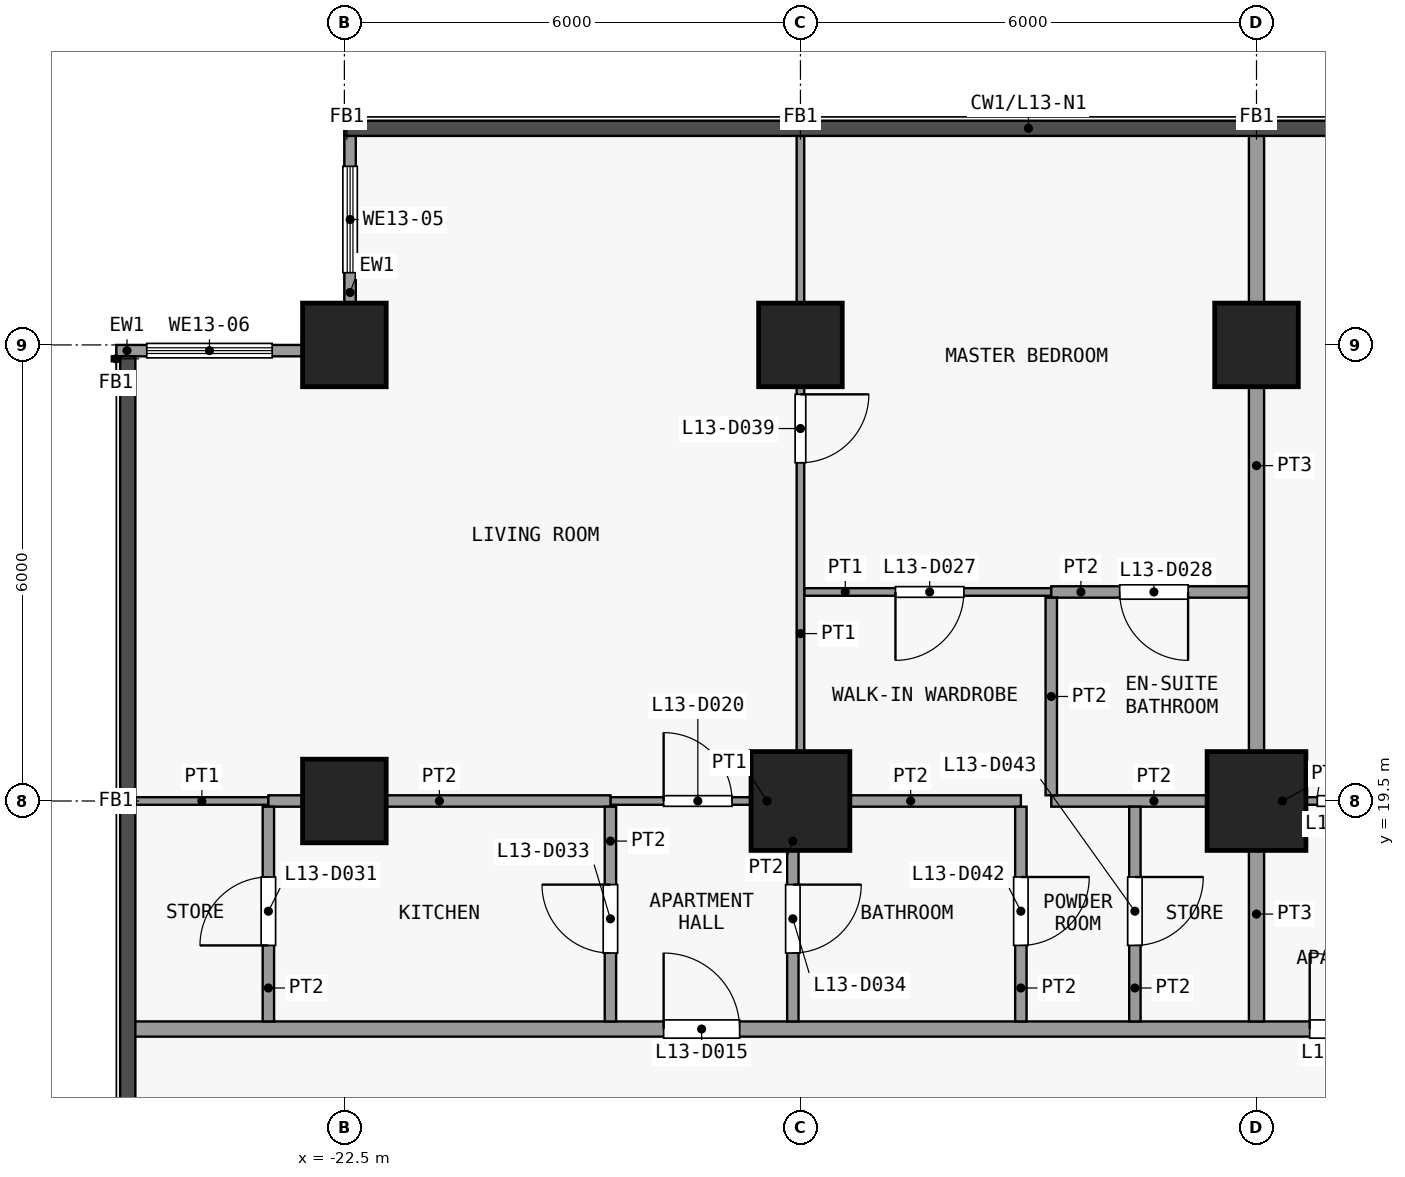
"""IFC4 building model, lengths in metres.
Left out: names, types, materials, properties, quantities, classifications, styles, units other than length and angle.
Written with IfcOpenShell. Run it as: python <this file> out.ifc"""

import sys

from ifc_helpers import new_model, si_unit, direction, frame, frame_2d, origin, origin_2d, place, context, subcontext, project, spatial, rectangle, extrude, element, fill, save


model = new_model("IFC4")
c1 = context("Model", 3, precision=1e-05, world=origin(), true_north=direction((0.0, 1.0)))
c2 = subcontext(c1, "Body", "Model", "MODEL_VIEW")
j1 = project(units=[si_unit("LENGTHUNIT", "METRE"), si_unit("PLANEANGLEUNIT", "RADIAN")], contexts=[c1])
p1 = place(None, origin())
s1 = spatial("IfcSite", under=j1, at=p1, CompositionType="ELEMENT")
p2 = place(p1, origin())
s2 = spatial("IfcBuilding", under=s1, at=p2, CompositionType="ELEMENT")
p3 = place(p2, frame((0.0, 0.0, 57.7)))
s3 = spatial("IfcBuildingStorey", under=s2, at=p3, CompositionType="ELEMENT", Elevation=57.7)
for number, where, z_axis, x_axis in (
    (1, (-22.5, 19.5, 0.0), (0.0, 0.0, 1.0), (1.0, 0.0, 0.0)),
    (2, (-22.5, 25.5, 0.0), (0.0, 0.0, 1.0), (1.0, 0.0, 0.0)),
):
    element("IfcColumn", number, at=place(p3, frame(where, z_axis=z_axis, x_axis=x_axis)), inside=s3, PredefinedType="COLUMN", context=c2, shape_type="SweptSolid", body=[
        extrude(rectangle(XDim=1.1, YDim=1.1, at=origin_2d()), origin(), (0.0, 0.0, 1.0), 3.6),
    ])
p4 = place(p3, frame((-16.5, 19.5, 0.0), z_axis=(0.0, 0.0, 1.0), x_axis=(1.0, 0.0, 0.0)))
e3 = element("IfcColumn", 3, at=p4, inside=s3, PredefinedType="COLUMN", context=c2, shape_type="SweptSolid", body=[
    extrude(rectangle(XDim=1.3, YDim=1.3, at=origin_2d()), origin(), (0.0, 0.0, 1.0), 3.6),
])
p5 = place(p3, frame((-16.5, 25.5, 0.0), z_axis=(0.0, 0.0, 1.0), x_axis=(1.0, 0.0, 0.0)))
e4 = element("IfcColumn", 4, at=p5, inside=s3, PredefinedType="COLUMN", context=c2, shape_type="SweptSolid", body=[
    extrude(rectangle(XDim=1.1, YDim=1.1, at=origin_2d()), origin(), (0.0, 0.0, 1.0), 3.6),
])
p6 = place(p3, frame((-10.5, 19.5, 0.0), z_axis=(0.0, 0.0, 1.0), x_axis=(1.0, 0.0, 0.0)))
e5 = element("IfcColumn", 5, at=p6, inside=s3, PredefinedType="COLUMN", context=c2, shape_type="SweptSolid", body=[
    extrude(rectangle(XDim=1.3, YDim=1.3, at=origin_2d()), origin(), (0.0, 0.0, 1.0), 3.6),
])
p7 = place(p3, frame((-10.5, 25.5, 0.0), z_axis=(0.0, 0.0, 1.0), x_axis=(1.0, 0.0, 0.0)))
e6 = element("IfcColumn", 6, at=p7, inside=s3, PredefinedType="COLUMN", context=c2, shape_type="SweptSolid", body=[
    extrude(rectangle(XDim=1.1, YDim=1.1, at=origin_2d()), origin(), (0.0, 0.0, 1.0), 3.6),
])
p8 = place(p3, frame((-22.425, 26.05, 0.0), z_axis=(0.0, 0.0, 1.0), x_axis=(0.0, 1.0, 0.0)))
e7 = element("IfcWall", 7, at=p8, inside=s3, PredefinedType="SOLIDWALL", context=c2, shape_type="SweptSolid", body=[
    extrude(rectangle(XDim=2.2, YDim=0.15, at=frame_2d((1.1, 0.0))), origin(), (0.0, 0.0, 1.0), 3.3),
])
p9 = place(p8, frame((0.4, 0.0, 0.9)))
e8 = element("IfcOpeningElement", 8, at=p9, cuts=e7, PredefinedType="OPENING", context=c2, shape_type="SweptSolid", body=[
    extrude(rectangle(XDim=1.4, YDim=2.4, at=frame_2d((0.7, 1.2))), frame((0.0, 0.085, 0.0), z_axis=(0.0, -1.0, 0.0), x_axis=(1.0, 0.0, 0.0)), (0.0, 0.0, 1.0), 0.17),
])
p10 = place(p3, frame((-25.5, 25.425, 0.0), z_axis=(0.0, 0.0, 1.0), x_axis=(1.0, 0.0, 0.0)))
e9 = element("IfcWall", 9, at=p10, inside=s3, PredefinedType="SOLIDWALL", context=c2, shape_type="SweptSolid", body=[
    extrude(rectangle(XDim=2.45, YDim=0.15, at=frame_2d((1.225, 0.0))), origin(), (0.0, 0.0, 1.0), 3.3),
])
p11 = place(p10, frame((0.4, 0.0, 0.9)))
e10 = element("IfcOpeningElement", 10, at=p11, cuts=e9, PredefinedType="OPENING", context=c2, shape_type="SweptSolid", body=[
    extrude(rectangle(XDim=1.65, YDim=2.4, at=frame_2d((0.825, 1.2))), frame((0.0, 0.085, 0.0), z_axis=(0.0, -1.0, 0.0), x_axis=(1.0, 0.0, 0.0)), (0.0, 0.0, 1.0), 0.17),
])
p12 = place(p3, frame((-25.35, 16.5, 0.0), z_axis=(0.0, 0.0, 1.0), x_axis=(1.0, 0.0, 0.0)))
e11 = element("IfcWall", 11, at=p12, inside=s3, PredefinedType="PARTITIONING", context=c2, shape_type="SweptSolid", body=[
    extrude(rectangle(XDim=50.7, YDim=0.2, at=frame_2d((25.35, 0.0))), origin(), (0.0, 0.0, 1.0), 3.3),
])
p13 = place(p12, frame((7.05, 0.0, 0.0)))
e12 = element("IfcOpeningElement", 12, at=p13, cuts=e11, PredefinedType="OPENING", context=c2, shape_type="SweptSolid", body=[
    extrude(rectangle(XDim=1.0, YDim=2.1, at=frame_2d((0.5, 1.05))), frame((0.0, 0.11, 0.0), z_axis=(0.0, -1.0, 0.0), x_axis=(1.0, 0.0, 0.0)), (0.0, 0.0, 1.0), 0.22),
])
p14 = place(p12, frame((15.55, 0.0, 0.0)))
e13 = element("IfcOpeningElement", 13, at=p14, cuts=e11, PredefinedType="OPENING", context=c2, shape_type="SweptSolid", body=[
    extrude(rectangle(XDim=1.0, YDim=2.1, at=frame_2d((0.5, 1.05))), frame((0.0, 0.11, 0.0), z_axis=(0.0, -1.0, 0.0), x_axis=(1.0, 0.0, 0.0)), (0.0, 0.0, 1.0), 0.22),
])
p15 = place(p12, frame((24.05, 0.0, 0.0)))
e14 = element("IfcOpeningElement", 14, at=p15, cuts=e11, PredefinedType="OPENING", context=c2, shape_type="SweptSolid", body=[
    extrude(rectangle(XDim=1.0, YDim=2.1, at=frame_2d((0.5, 1.05))), frame((0.0, 0.11, 0.0), z_axis=(0.0, -1.0, 0.0), x_axis=(1.0, 0.0, 0.0)), (0.0, 0.0, 1.0), 0.22),
])
p16 = place(p12, frame((36.55, 0.0, 0.0)))
e15 = element("IfcOpeningElement", 15, at=p16, cuts=e11, PredefinedType="OPENING", context=c2, shape_type="SweptSolid", body=[
    extrude(rectangle(XDim=1.0, YDim=2.1, at=frame_2d((0.5, 1.05))), frame((0.0, 0.11, 0.0), z_axis=(0.0, -1.0, 0.0), x_axis=(1.0, 0.0, 0.0)), (0.0, 0.0, 1.0), 0.22),
])
p17 = place(p12, frame((45.05, 0.0, 0.0)))
e16 = element("IfcOpeningElement", 16, at=p17, cuts=e11, PredefinedType="OPENING", context=c2, shape_type="SweptSolid", body=[
    extrude(rectangle(XDim=1.0, YDim=2.1, at=frame_2d((0.5, 1.05))), frame((0.0, 0.11, 0.0), z_axis=(0.0, -1.0, 0.0), x_axis=(1.0, 0.0, 0.0)), (0.0, 0.0, 1.0), 0.22),
])
p18 = place(p3, frame((-25.25, 19.5, 0.0), z_axis=(0.0, 0.0, 1.0), x_axis=(1.0, 0.0, 0.0)))
e17 = element("IfcWall", 17, at=p18, inside=s3, PredefinedType="PARTITIONING", context=c2, shape_type="SweptSolid", body=[
    extrude(rectangle(XDim=1.75, YDim=0.1, at=frame_2d((0.875, 0.0))), origin(), (0.0, 0.0, 1.0), 3.3),
])
p19 = place(p3, frame((-19.0, 19.5, 0.0), z_axis=(0.0, 0.0, 1.0), x_axis=(1.0, 0.0, 0.0)))
e18 = element("IfcWall", 18, at=p19, inside=s3, PredefinedType="PARTITIONING", context=c2, shape_type="SweptSolid", body=[
    extrude(rectangle(XDim=2.4, YDim=0.1, at=frame_2d((1.2, 0.0))), origin(), (0.0, 0.0, 1.0), 3.3),
])
p20 = place(p19, frame((0.7, 0.0, 0.0)))
e19 = element("IfcOpeningElement", 19, at=p20, cuts=e18, PredefinedType="OPENING", context=c2, shape_type="SweptSolid", body=[
    extrude(rectangle(XDim=0.9, YDim=2.1, at=frame_2d((0.45, 1.05))), frame((0.0, 0.06, 0.0), z_axis=(0.0, -1.0, 0.0), x_axis=(1.0, 0.0, 0.0)), (0.0, 0.0, 1.0), 0.12),
])
p21 = place(p3, frame((-10.5, 19.5, 0.0), z_axis=(0.0, 0.0, 1.0), x_axis=(1.0, 0.0, 0.0)))
e20 = element("IfcWall", 20, at=p21, inside=s3, PredefinedType="PARTITIONING", context=c2, shape_type="SweptSolid", body=[
    extrude(rectangle(XDim=2.4, YDim=0.1, at=frame_2d((1.2, 0.0))), origin(), (0.0, 0.0, 1.0), 3.3),
])
p22 = place(p21, frame((0.8, 0.0, 0.0)))
e21 = element("IfcOpeningElement", 21, at=p22, cuts=e20, PredefinedType="OPENING", context=c2, shape_type="SweptSolid", body=[
    extrude(rectangle(XDim=0.9, YDim=2.1, at=frame_2d((0.45, 1.05))), frame((0.0, 0.06, 0.0), z_axis=(0.0, -1.0, 0.0), x_axis=(1.0, 0.0, 0.0)), (0.0, 0.0, 1.0), 0.12),
])
p23 = place(p3, frame((-23.5, 19.5, 0.0), z_axis=(0.0, 0.0, 1.0), x_axis=(1.0, 0.0, 0.0)))
e22 = element("IfcWall", 22, at=p23, inside=s3, PredefinedType="PARTITIONING", context=c2, shape_type="SweptSolid", body=[
    extrude(rectangle(XDim=4.5, YDim=0.15, at=frame_2d((2.25, 0.0))), origin(), (0.0, 0.0, 1.0), 3.3),
])
p24 = place(p3, frame((-16.5, 19.5, 0.0), z_axis=(0.0, 0.0, 1.0), x_axis=(1.0, 0.0, 0.0)))
e23 = element("IfcWall", 23, at=p24, inside=s3, PredefinedType="PARTITIONING", context=c2, shape_type="SweptSolid", body=[
    extrude(rectangle(XDim=2.9, YDim=0.15, at=frame_2d((1.45, 0.0))), origin(), (0.0, 0.0, 1.0), 3.3),
])
p25 = place(p3, frame((-13.2, 19.5, 0.0), z_axis=(0.0, 0.0, 1.0), x_axis=(1.0, 0.0, 0.0)))
e24 = element("IfcWall", 24, at=p25, inside=s3, PredefinedType="PARTITIONING", context=c2, shape_type="SweptSolid", body=[
    extrude(rectangle(XDim=2.7, YDim=0.15, at=frame_2d((1.35, 0.0))), origin(), (0.0, 0.0, 1.0), 3.3),
])
p26 = place(p3, frame((-16.45, 22.25, 0.0), z_axis=(0.0, 0.0, 1.0), x_axis=(1.0, 0.0, 0.0)))
e25 = element("IfcWall", 25, at=p26, inside=s3, PredefinedType="PARTITIONING", context=c2, shape_type="SweptSolid", body=[
    extrude(rectangle(XDim=3.25, YDim=0.1, at=frame_2d((1.625, 0.0))), origin(), (0.0, 0.0, 1.0), 3.3),
])
p27 = place(p26, frame((1.2, 0.0, 0.0)))
e26 = element("IfcOpeningElement", 26, at=p27, cuts=e25, PredefinedType="OPENING", context=c2, shape_type="SweptSolid", body=[
    extrude(rectangle(XDim=0.9, YDim=2.1, at=frame_2d((0.45, 1.05))), frame((0.0, 0.06, 0.0), z_axis=(0.0, -1.0, 0.0), x_axis=(1.0, 0.0, 0.0)), (0.0, 0.0, 1.0), 0.12),
])
p28 = place(p3, frame((-13.2, 22.25, 0.0), z_axis=(0.0, 0.0, 1.0), x_axis=(1.0, 0.0, 0.0)))
e27 = element("IfcWall", 27, at=p28, inside=s3, PredefinedType="PARTITIONING", context=c2, shape_type="SweptSolid", body=[
    extrude(rectangle(XDim=2.6, YDim=0.15, at=frame_2d((1.3, 0.0))), origin(), (0.0, 0.0, 1.0), 3.3),
])
p29 = place(p28, frame((0.9, 0.0, 0.0)))
e28 = element("IfcOpeningElement", 28, at=p29, cuts=e27, PredefinedType="OPENING", context=c2, shape_type="SweptSolid", body=[
    extrude(rectangle(XDim=0.9, YDim=2.1, at=frame_2d((0.45, 1.05))), frame((0.0, 0.085, 0.0), z_axis=(0.0, -1.0, 0.0), x_axis=(1.0, 0.0, 0.0)), (0.0, 0.0, 1.0), 0.17),
])
p30 = place(p3, frame((-23.5, 16.6, 0.0), z_axis=(0.0, 0.0, 1.0), x_axis=(0.0, 1.0, 0.0)))
e29 = element("IfcWall", 29, at=p30, inside=s3, PredefinedType="PARTITIONING", context=c2, shape_type="SweptSolid", body=[
    extrude(rectangle(XDim=2.825, YDim=0.15, at=frame_2d((1.413, 0.0))), origin(), (0.0, 0.0, 1.0), 3.3),
])
p31 = place(p30, frame((1.0, 0.0, 0.0)))
e30 = element("IfcOpeningElement", 30, at=p31, cuts=e29, PredefinedType="OPENING", context=c2, shape_type="SweptSolid", body=[
    extrude(rectangle(XDim=0.9, YDim=2.1, at=frame_2d((0.45, 1.05))), frame((0.0, 0.085, 0.0), z_axis=(0.0, -1.0, 0.0), x_axis=(1.0, 0.0, 0.0)), (0.0, 0.0, 1.0), 0.17),
])
p32 = place(p3, frame((-19.0, 16.6, 0.0), z_axis=(0.0, 0.0, 1.0), x_axis=(0.0, 1.0, 0.0)))
e31 = element("IfcWall", 31, at=p32, inside=s3, PredefinedType="PARTITIONING", context=c2, shape_type="SweptSolid", body=[
    extrude(rectangle(XDim=2.825, YDim=0.15, at=frame_2d((1.413, 0.0))), origin(), (0.0, 0.0, 1.0), 3.3),
])
p33 = place(p32, frame((0.9, 0.0, 0.0)))
e32 = element("IfcOpeningElement", 32, at=p33, cuts=e31, PredefinedType="OPENING", context=c2, shape_type="SweptSolid", body=[
    extrude(rectangle(XDim=0.9, YDim=2.1, at=frame_2d((0.45, 1.05))), frame((0.0, 0.085, 0.0), z_axis=(0.0, -1.0, 0.0), x_axis=(1.0, 0.0, 0.0)), (0.0, 0.0, 1.0), 0.17),
])
p34 = place(p3, frame((-16.6, 16.6, 0.0), z_axis=(0.0, 0.0, 1.0), x_axis=(0.0, 1.0, 0.0)))
e33 = element("IfcWall", 33, at=p34, inside=s3, PredefinedType="PARTITIONING", context=c2, shape_type="SweptSolid", body=[
    extrude(rectangle(XDim=2.825, YDim=0.15, at=frame_2d((1.413, 0.0))), origin(), (0.0, 0.0, 1.0), 3.3),
])
p35 = place(p34, frame((0.9, 0.0, 0.0)))
e34 = element("IfcOpeningElement", 34, at=p35, cuts=e33, PredefinedType="OPENING", context=c2, shape_type="SweptSolid", body=[
    extrude(rectangle(XDim=0.9, YDim=2.1, at=frame_2d((0.45, 1.05))), frame((0.0, 0.085, 0.0), z_axis=(0.0, -1.0, 0.0), x_axis=(1.0, 0.0, 0.0)), (0.0, 0.0, 1.0), 0.17),
])
p36 = place(p3, frame((-16.5, 19.575, 0.0), z_axis=(0.0, 0.0, 1.0), x_axis=(0.0, 1.0, 0.0)))
e35 = element("IfcWall", 35, at=p36, inside=s3, PredefinedType="PARTITIONING", context=c2, shape_type="SweptSolid", body=[
    extrude(rectangle(XDim=8.675, YDim=0.1, at=frame_2d((4.337, 0.0))), origin(), (0.0, 0.0, 1.0), 3.3),
])
p37 = place(p36, frame((4.375, 0.0, 0.0)))
e36 = element("IfcOpeningElement", 36, at=p37, cuts=e35, PredefinedType="OPENING", context=c2, shape_type="SweptSolid", body=[
    extrude(rectangle(XDim=0.9, YDim=2.1, at=frame_2d((0.45, 1.05))), frame((0.0, 0.06, 0.0), z_axis=(0.0, -1.0, 0.0), x_axis=(1.0, 0.0, 0.0)), (0.0, 0.0, 1.0), 0.12),
])
p38 = place(p3, frame((-13.6, 16.6, 0.0), z_axis=(0.0, 0.0, 1.0), x_axis=(0.0, 1.0, 0.0)))
e37 = element("IfcWall", 37, at=p38, inside=s3, PredefinedType="PARTITIONING", context=c2, shape_type="SweptSolid", body=[
    extrude(rectangle(XDim=2.825, YDim=0.15, at=frame_2d((1.413, 0.0))), origin(), (0.0, 0.0, 1.0), 3.3),
])
p39 = place(p38, frame((1.0, 0.0, 0.0)))
e38 = element("IfcOpeningElement", 38, at=p39, cuts=e37, PredefinedType="OPENING", context=c2, shape_type="SweptSolid", body=[
    extrude(rectangle(XDim=0.9, YDim=2.1, at=frame_2d((0.45, 1.05))), frame((0.0, 0.085, 0.0), z_axis=(0.0, -1.0, 0.0), x_axis=(1.0, 0.0, 0.0)), (0.0, 0.0, 1.0), 0.17),
])
p40 = place(p3, frame((-13.2, 19.575, 0.0), z_axis=(0.0, 0.0, 1.0), x_axis=(0.0, 1.0, 0.0)))
e39 = element("IfcWall", 39, at=p40, inside=s3, PredefinedType="PARTITIONING", context=c2, shape_type="SweptSolid", body=[
    extrude(rectangle(XDim=2.6, YDim=0.15, at=frame_2d((1.3, 0.0))), origin(), (0.0, 0.0, 1.0), 3.3),
])
p41 = place(p3, frame((-12.1, 16.6, 0.0), z_axis=(0.0, 0.0, 1.0), x_axis=(0.0, 1.0, 0.0)))
e40 = element("IfcWall", 40, at=p41, inside=s3, PredefinedType="PARTITIONING", context=c2, shape_type="SweptSolid", body=[
    extrude(rectangle(XDim=2.825, YDim=0.15, at=frame_2d((1.413, 0.0))), origin(), (0.0, 0.0, 1.0), 3.3),
])
p42 = place(p41, frame((1.0, 0.0, 0.0)))
e41 = element("IfcOpeningElement", 41, at=p42, cuts=e40, PredefinedType="OPENING", context=c2, shape_type="SweptSolid", body=[
    extrude(rectangle(XDim=0.9, YDim=2.1, at=frame_2d((0.45, 1.05))), frame((0.0, 0.085, 0.0), z_axis=(0.0, -1.0, 0.0), x_axis=(1.0, 0.0, 0.0)), (0.0, 0.0, 1.0), 0.17),
])
p43 = place(p3, frame((-10.5, 16.6, 0.0), z_axis=(0.0, 0.0, 1.0), x_axis=(0.0, 1.0, 0.0)))
e42 = element("IfcWall", 42, at=p43, inside=s3, PredefinedType="PARTITIONING", context=c2, shape_type="SweptSolid", body=[
    extrude(rectangle(XDim=2.825, YDim=0.2, at=frame_2d((1.413, 0.0))), origin(), (0.0, 0.0, 1.0), 3.3),
])
p44 = place(p3, frame((-10.5, 19.575, 0.0), z_axis=(0.0, 0.0, 1.0), x_axis=(0.0, 1.0, 0.0)))
e43 = element("IfcWall", 43, at=p44, inside=s3, PredefinedType="PARTITIONING", context=c2, shape_type="SweptSolid", body=[
    extrude(rectangle(XDim=8.675, YDim=0.2, at=frame_2d((4.337, 0.0))), origin(), (0.0, 0.0, 1.0), 3.3),
])
p45 = place(p9, origin())
e44 = element("IfcWindow", 44, at=p45, inside=s3, PartitioningType="SINGLE_PANEL", PredefinedType="WINDOW", context=c2, shape_type="SweptSolid", body=[
    extrude(rectangle(XDim=1.4, YDim=2.4, at=frame_2d((0.7, 1.2))), frame((0.0, 0.03, 0.0), z_axis=(0.0, -1.0, 0.0), x_axis=(1.0, 0.0, 0.0)), (0.0, 0.0, 1.0), 0.06),
])
fill(e8, e44)
p46 = place(p11, origin())
e45 = element("IfcWindow", 45, at=p46, inside=s3, PartitioningType="SINGLE_PANEL", PredefinedType="WINDOW", context=c2, shape_type="SweptSolid", body=[
    extrude(rectangle(XDim=1.65, YDim=2.4, at=frame_2d((0.825, 1.2))), frame((0.0, 0.03, 0.0), z_axis=(0.0, -1.0, 0.0), x_axis=(1.0, 0.0, 0.0)), (0.0, 0.0, 1.0), 0.06),
])
fill(e10, e45)
p47 = place(p13, origin())
e46 = element("IfcDoor", 46, at=p47, inside=s3, OperationType="SINGLE_SWING_RIGHT", PredefinedType="DOOR", context=c2, shape_type="SweptSolid", body=[
    extrude(rectangle(XDim=1.0, YDim=2.1, at=frame_2d((0.5, 1.05))), frame((0.0, 0.025, 0.0), z_axis=(0.0, -1.0, 0.0), x_axis=(1.0, 0.0, 0.0)), (0.0, 0.0, 1.0), 0.05),
])
fill(e12, e46)
p48 = place(p14, origin())
e47 = element("IfcDoor", 47, at=p48, inside=s3, OperationType="SINGLE_SWING_RIGHT", PredefinedType="DOOR", context=c2, shape_type="SweptSolid", body=[
    extrude(rectangle(XDim=1.0, YDim=2.1, at=frame_2d((0.5, 1.05))), frame((0.0, 0.025, 0.0), z_axis=(0.0, -1.0, 0.0), x_axis=(1.0, 0.0, 0.0)), (0.0, 0.0, 1.0), 0.05),
])
fill(e13, e47)
p49 = place(p20, origin())
e48 = element("IfcDoor", 48, at=p49, inside=s3, OperationType="SINGLE_SWING_RIGHT", PredefinedType="DOOR", context=c2, shape_type="SweptSolid", body=[
    extrude(rectangle(XDim=0.9, YDim=2.1, at=frame_2d((0.45, 1.05))), frame((0.0, 0.025, 0.0), z_axis=(0.0, -1.0, 0.0), x_axis=(1.0, 0.0, 0.0)), (0.0, 0.0, 1.0), 0.05),
])
fill(e19, e48)
p50 = place(p22, origin())
e49 = element("IfcDoor", 49, at=p50, inside=s3, OperationType="SINGLE_SWING_LEFT", PredefinedType="DOOR", context=c2, shape_type="SweptSolid", body=[
    extrude(rectangle(XDim=0.9, YDim=2.1, at=frame_2d((0.45, 1.05))), frame((0.0, 0.025, 0.0), z_axis=(0.0, -1.0, 0.0), x_axis=(1.0, 0.0, 0.0)), (0.0, 0.0, 1.0), 0.05),
])
fill(e21, e49)
p51 = place(p27, origin())
e50 = element("IfcDoor", 50, at=p51, inside=s3, OperationType="SINGLE_SWING_LEFT", PredefinedType="DOOR", context=c2, shape_type="SweptSolid", body=[
    extrude(rectangle(XDim=0.9, YDim=2.1, at=frame_2d((0.45, 1.05))), frame((0.0, 0.025, 0.0), z_axis=(0.0, -1.0, 0.0), x_axis=(1.0, 0.0, 0.0)), (0.0, 0.0, 1.0), 0.05),
])
fill(e26, e50)
p52 = place(p29, origin())
e51 = element("IfcDoor", 51, at=p52, inside=s3, OperationType="SINGLE_SWING_RIGHT", PredefinedType="DOOR", context=c2, shape_type="SweptSolid", body=[
    extrude(rectangle(XDim=0.9, YDim=2.1, at=frame_2d((0.45, 1.05))), frame((0.0, 0.025, 0.0), z_axis=(0.0, -1.0, 0.0), x_axis=(1.0, 0.0, 0.0)), (0.0, 0.0, 1.0), 0.05),
])
fill(e28, e51)
p53 = place(p31, origin())
e52 = element("IfcDoor", 52, at=p53, inside=s3, OperationType="SINGLE_SWING_RIGHT", PredefinedType="DOOR", context=c2, shape_type="SweptSolid", body=[
    extrude(rectangle(XDim=0.9, YDim=2.1, at=frame_2d((0.45, 1.05))), frame((0.0, 0.025, 0.0), z_axis=(0.0, -1.0, 0.0), x_axis=(1.0, 0.0, 0.0)), (0.0, 0.0, 1.0), 0.05),
])
fill(e30, e52)
p54 = place(p33, origin())
e53 = element("IfcDoor", 53, at=p54, inside=s3, OperationType="SINGLE_SWING_LEFT", PredefinedType="DOOR", context=c2, shape_type="SweptSolid", body=[
    extrude(rectangle(XDim=0.9, YDim=2.1, at=frame_2d((0.45, 1.05))), frame((0.0, 0.025, 0.0), z_axis=(0.0, -1.0, 0.0), x_axis=(1.0, 0.0, 0.0)), (0.0, 0.0, 1.0), 0.05),
])
fill(e32, e53)
p55 = place(p35, origin())
e54 = element("IfcDoor", 54, at=p55, inside=s3, OperationType="SINGLE_SWING_RIGHT", PredefinedType="DOOR", context=c2, shape_type="SweptSolid", body=[
    extrude(rectangle(XDim=0.9, YDim=2.1, at=frame_2d((0.45, 1.05))), frame((0.0, 0.025, 0.0), z_axis=(0.0, -1.0, 0.0), x_axis=(1.0, 0.0, 0.0)), (0.0, 0.0, 1.0), 0.05),
])
fill(e34, e54)
p56 = place(p37, origin())
e55 = element("IfcDoor", 55, at=p56, inside=s3, OperationType="SINGLE_SWING_RIGHT", PredefinedType="DOOR", context=c2, shape_type="SweptSolid", body=[
    extrude(rectangle(XDim=0.9, YDim=2.1, at=frame_2d((0.45, 1.05))), frame((0.0, 0.025, 0.0), z_axis=(0.0, -1.0, 0.0), x_axis=(1.0, 0.0, 0.0)), (0.0, 0.0, 1.0), 0.05),
])
fill(e36, e55)
p57 = place(p39, origin())
e56 = element("IfcDoor", 56, at=p57, inside=s3, OperationType="SINGLE_SWING_RIGHT", PredefinedType="DOOR", context=c2, shape_type="SweptSolid", body=[
    extrude(rectangle(XDim=0.9, YDim=2.1, at=frame_2d((0.45, 1.05))), frame((0.0, 0.025, 0.0), z_axis=(0.0, -1.0, 0.0), x_axis=(1.0, 0.0, 0.0)), (0.0, 0.0, 1.0), 0.05),
])
fill(e38, e56)
p58 = place(p42, origin())
e57 = element("IfcDoor", 57, at=p58, inside=s3, OperationType="SINGLE_SWING_RIGHT", PredefinedType="DOOR", context=c2, shape_type="SweptSolid", body=[
    extrude(rectangle(XDim=0.9, YDim=2.1, at=frame_2d((0.45, 1.05))), frame((0.0, 0.025, 0.0), z_axis=(0.0, -1.0, 0.0), x_axis=(1.0, 0.0, 0.0)), (0.0, 0.0, 1.0), 0.05),
])
fill(e41, e57)
save(model, sys.argv[1])
